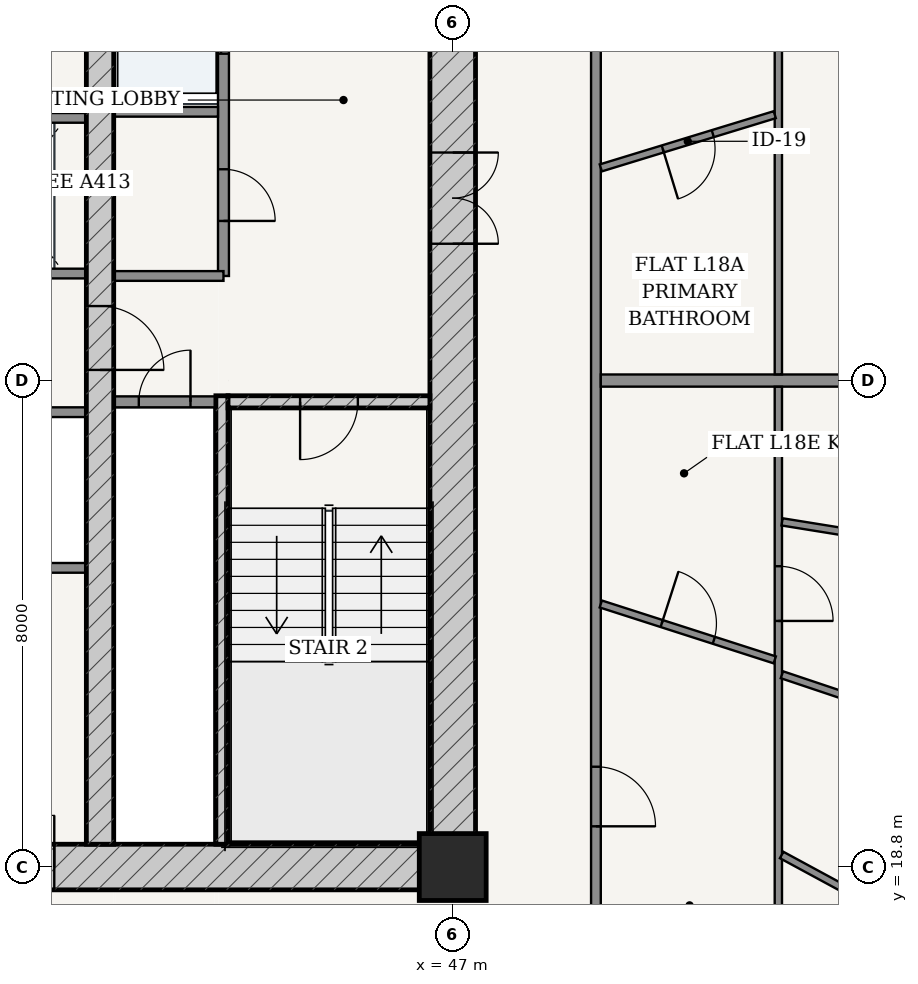
"""IFC4 building model, lengths in metres.
Left out: names, types, materials, properties, quantities, classifications, styles, units other than length and angle.
Written with IfcOpenShell. Run it as: python <this file> out.ifc"""

import sys

from ifc_helpers import new_model, si_unit, direction, frame, frame_2d, origin, origin_2d, place, context, subcontext, project, spatial, rectangle, extrude, source, transform, mapped, element, fill, save


model = new_model("IFC4")
c1 = context("Model", 3, precision=1e-05, world=origin(), true_north=direction((-0.2419218956, 0.970295726276)))
c2 = subcontext(c1, "Body", "Model", "MODEL_VIEW")
j1 = project(units=[si_unit("LENGTHUNIT", "METRE"), si_unit("PLANEANGLEUNIT", "RADIAN")], contexts=[c1])
p1 = place(None, origin())
s1 = spatial("IfcSite", under=j1, at=p1, CompositionType="ELEMENT")
p2 = place(p1, origin())
s2 = spatial("IfcBuilding", under=s1, at=p2, CompositionType="ELEMENT")
p3 = place(p2, frame((0.0, 0.0, 70.8)))
s3 = spatial("IfcBuildingStorey", under=s2, at=p3, CompositionType="ELEMENT", Elevation=70.8)
p4 = place(p3, frame((47.0, 18.8, 0.0), z_axis=(0.0, 0.0, 1.0), x_axis=(1.0, 0.0, 0.0)))
e1 = element("IfcColumn", 1, at=p4, inside=s3, PredefinedType="COLUMN", context=c2, shape_type="SweptSolid", body=[
    extrude(rectangle(XDim=1.1, YDim=1.1, at=origin_2d()), origin(), (0.0, 0.0, 1.0), 3.6),
])
p5 = place(p3, frame((28.625, 18.8, 0.0), z_axis=(0.0, 0.0, 1.0), x_axis=(1.0, 0.0, 0.0)))
e2 = element("IfcWall", 2, at=p5, inside=s3, PredefinedType="SHEAR", context=c2, shape_type="SweptSolid", body=[
    extrude(rectangle(XDim=18.75, YDim=0.75, at=frame_2d((9.375, 0.0))), origin(), (0.0, 0.0, 1.0), 3.15),
])
p6 = place(p5, frame((6.927, 0.0, 0.0)))
e3 = element("IfcOpeningElement", 3, at=p6, cuts=e2, PredefinedType="OPENING", context=c2, shape_type="SweptSolid", body=[
    extrude(rectangle(XDim=0.85, YDim=2.1, at=frame_2d((0.425, 1.05))), frame((0.0, 0.385, 0.0), z_axis=(0.0, -1.0, 0.0), x_axis=(1.0, 0.0, 0.0)), (0.0, 0.0, 1.0), 0.77),
])
p7 = place(p5, frame((8.95, 0.0, 0.0)))
e4 = element("IfcOpeningElement", 4, at=p7, cuts=e2, PredefinedType="OPENING", context=c2, shape_type="SweptSolid", body=[
    extrude(rectangle(XDim=0.85, YDim=2.1, at=frame_2d((0.425, 1.05))), frame((0.0, 0.385, 0.0), z_axis=(0.0, -1.0, 0.0), x_axis=(1.0, 0.0, 0.0)), (0.0, 0.0, 1.0), 0.77),
])
p8 = place(p5, frame((10.972, 0.0, 0.0)))
e5 = element("IfcOpeningElement", 5, at=p8, cuts=e2, PredefinedType="OPENING", context=c2, shape_type="SweptSolid", body=[
    extrude(rectangle(XDim=0.85, YDim=2.1, at=frame_2d((0.425, 1.05))), frame((0.0, 0.385, 0.0), z_axis=(0.0, -1.0, 0.0), x_axis=(1.0, 0.0, 0.0)), (0.0, 0.0, 1.0), 0.77),
])
p9 = place(p3, frame((47.0, 19.175, 0.0), z_axis=(0.0, 0.0, 1.0), x_axis=(0.0, 1.0, 0.0)))
e6 = element("IfcWall", 6, at=p9, inside=s3, PredefinedType="SHEAR", context=c2, shape_type="SweptSolid", body=[
    extrude(rectangle(XDim=15.25, YDim=0.75, at=frame_2d((7.625, 0.0))), origin(), (0.0, 0.0, 1.0), 3.15),
])
p10 = place(p9, frame((9.875, 0.0, 0.0)))
e7 = element("IfcOpeningElement", 7, at=p10, cuts=e6, PredefinedType="OPENING", context=c2, shape_type="SweptSolid", body=[
    extrude(rectangle(XDim=1.5, YDim=2.2, at=frame_2d((0.75, 1.1))), frame((0.0, 0.385, 0.0), z_axis=(0.0, -1.0, 0.0), x_axis=(1.0, 0.0, 0.0)), (0.0, 0.0, 1.0), 0.77),
])
p11 = place(p3, frame((43.205, 19.175, 0.0), z_axis=(0.0, 0.0, 1.0), x_axis=(0.0, 1.0, 0.0)))
e8 = element("IfcWall", 8, at=p11, inside=s3, PredefinedType="SOLIDWALL", context=c2, shape_type="SweptSolid", body=[
    extrude(rectangle(XDim=7.375, YDim=0.2, at=frame_2d((3.688, 0.0))), origin(), (0.0, 0.0, 1.0), 3.15),
])
p12 = place(p3, frame((43.305, 26.45, 0.0), z_axis=(0.0, 0.0, 1.0), x_axis=(1.0, 0.0, 0.0)))
e9 = element("IfcWall", 9, at=p12, inside=s3, PredefinedType="SOLIDWALL", context=c2, shape_type="SweptSolid", body=[
    extrude(rectangle(XDim=3.32, YDim=0.2, at=frame_2d((1.66, 0.0))), origin(), (0.0, 0.0, 1.0), 3.15),
])
p13 = place(p12, frame((1.185, 0.0, 0.0)))
e10 = element("IfcOpeningElement", 10, at=p13, cuts=e9, PredefinedType="OPENING", context=c2, shape_type="SweptSolid", body=[
    extrude(rectangle(XDim=0.95, YDim=2.15, at=frame_2d((0.475, 1.075))), frame((0.0, 0.11, 0.0), z_axis=(0.0, -1.0, 0.0), x_axis=(1.0, 0.0, 0.0)), (0.0, 0.0, 1.0), 0.22),
])
p14 = place(p3, frame((41.2, 19.175, 0.0), z_axis=(0.0, 0.0, 1.0), x_axis=(0.0, 1.0, 0.0)))
e11 = element("IfcWall", 11, at=p14, inside=s3, PredefinedType="SHEAR", context=c2, shape_type="SweptSolid", body=[
    extrude(rectangle(XDim=15.25, YDim=0.45, at=frame_2d((7.625, 0.0))), origin(), (0.0, 0.0, 1.0), 3.15),
])
p15 = place(p14, frame((7.8, 0.0, 0.0)))
e12 = element("IfcOpeningElement", 12, at=p15, cuts=e11, PredefinedType="OPENING", context=c2, shape_type="SweptSolid", body=[
    extrude(rectangle(XDim=1.05, YDim=2.15, at=frame_2d((0.525, 1.075))), frame((0.0, 0.235, 0.0), z_axis=(0.0, -1.0, 0.0), x_axis=(1.0, 0.0, 0.0)), (0.0, 0.0, 1.0), 0.47),
])
p16 = place(p3, frame((41.425, 26.45, 0.0), z_axis=(0.0, 0.0, 1.0), x_axis=(1.0, 0.0, 0.0)))
e13 = element("IfcWall", 13, at=p16, inside=s3, PredefinedType="PARTITIONING", context=c2, shape_type="SweptSolid", body=[
    extrude(rectangle(XDim=1.675, YDim=0.18, at=frame_2d((0.837, 0.0))), origin(), (0.0, 0.0, 1.0), 3.15),
])
p17 = place(p16, frame((0.413, 0.0, 0.0)))
e14 = element("IfcOpeningElement", 14, at=p17, cuts=e13, PredefinedType="OPENING", context=c2, shape_type="SweptSolid", body=[
    extrude(rectangle(XDim=0.85, YDim=2.1, at=frame_2d((0.425, 1.05))), frame((0.0, 0.1, 0.0), z_axis=(0.0, -1.0, 0.0), x_axis=(1.0, 0.0, 0.0)), (0.0, 0.0, 1.0), 0.2),
])
p18 = place(p3, frame((43.23, 28.52, 0.0), z_axis=(0.0, 0.0, 1.0), x_axis=(0.0, 1.0, 0.0)))
e15 = element("IfcWall", 15, at=p18, inside=s3, PredefinedType="PARTITIONING", context=c2, shape_type="SweptSolid", body=[
    extrude(rectangle(XDim=5.905, YDim=0.18, at=frame_2d((2.953, 0.0))), origin(), (0.0, 0.0, 1.0), 3.15),
])
p19 = place(p18, frame((0.905, 0.0, 0.0)))
e16 = element("IfcOpeningElement", 16, at=p19, cuts=e15, PredefinedType="OPENING", context=c2, shape_type="SweptSolid", body=[
    extrude(rectangle(XDim=0.85, YDim=2.1, at=frame_2d((0.425, 1.05))), frame((0.0, 0.1, 0.0), z_axis=(0.0, -1.0, 0.0), x_axis=(1.0, 0.0, 0.0)), (0.0, 0.0, 1.0), 0.2),
])
p20 = place(p18, frame((3.655, 0.0, 0.0)))
e17 = element("IfcOpeningElement", 17, at=p20, cuts=e15, PredefinedType="OPENING", context=c2, shape_type="SweptSolid", body=[
    extrude(rectangle(XDim=1.15, YDim=2.2, at=frame_2d((0.575, 1.1))), frame((0.0, 0.1, 0.0), z_axis=(0.0, -1.0, 0.0), x_axis=(1.0, 0.0, 0.0)), (0.0, 0.0, 1.0), 0.2),
])
p21 = place(p3, frame((41.425, 31.22, 0.0), z_axis=(0.0, 0.0, 1.0), x_axis=(1.0, 0.0, 0.0)))
e18 = element("IfcWall", 18, at=p21, inside=s3, PredefinedType="PARTITIONING", context=c2, shape_type="SweptSolid", body=[
    extrude(rectangle(XDim=1.715, YDim=0.16, at=frame_2d((0.857, 0.0))), origin(), (0.0, 0.0, 1.0), 3.15),
])
p22 = place(p3, frame((41.425, 28.52, 0.0), z_axis=(0.0, 0.0, 1.0), x_axis=(1.0, 0.0, 0.0)))
e19 = element("IfcWall", 19, at=p22, inside=s3, PredefinedType="PARTITIONING", context=c2, shape_type="SweptSolid", body=[
    extrude(rectangle(XDim=1.805, YDim=0.16, at=frame_2d((0.902, 0.0))), origin(), (0.0, 0.0, 1.0), 3.15),
])
p23 = place(p3, frame((35.025, 28.56, 0.0), z_axis=(0.0, 0.0, 1.0), x_axis=(1.0, 0.0, 0.0)))
e20 = element("IfcWall", 20, at=p23, inside=s3, PredefinedType="PARTITIONING", context=c2, shape_type="SweptSolid", body=[
    extrude(rectangle(XDim=5.95, YDim=0.16, at=frame_2d((2.975, 0.0))), origin(), (0.0, 0.0, 1.0), 3.15),
])
p24 = place(p23, frame((0.76, 0.0, 0.0)))
e21 = element("IfcOpeningElement", 21, at=p24, cuts=e20, PredefinedType="OPENING", context=c2, shape_type="SweptSolid", body=[
    extrude(rectangle(XDim=1.1, YDim=2.2, at=frame_2d((0.55, 1.1))), frame((0.0, 0.09, 0.0), z_axis=(0.0, -1.0, 0.0), x_axis=(1.0, 0.0, 0.0)), (0.0, 0.0, 1.0), 0.18),
])
p25 = place(p23, frame((2.425, 0.0, 0.0)))
e22 = element("IfcOpeningElement", 22, at=p25, cuts=e20, PredefinedType="OPENING", context=c2, shape_type="SweptSolid", body=[
    extrude(rectangle(XDim=1.1, YDim=2.2, at=frame_2d((0.55, 1.1))), frame((0.0, 0.09, 0.0), z_axis=(0.0, -1.0, 0.0), x_axis=(1.0, 0.0, 0.0)), (0.0, 0.0, 1.0), 0.18),
])
p26 = place(p23, frame((4.09, 0.0, 0.0)))
e23 = element("IfcOpeningElement", 23, at=p26, cuts=e20, PredefinedType="OPENING", context=c2, shape_type="SweptSolid", body=[
    extrude(rectangle(XDim=1.1, YDim=2.2, at=frame_2d((0.55, 1.1))), frame((0.0, 0.09, 0.0), z_axis=(0.0, -1.0, 0.0), x_axis=(1.0, 0.0, 0.0)), (0.0, 0.0, 1.0), 0.18),
])
for number, where, z_axis, x_axis in (
    (24, (35.025, 31.12, 0.0), (0.0, 0.0, 1.0), (1.0, 0.0, 0.0)),
    (25, (35.025, 26.28, 0.0), (0.0, 0.0, 1.0), (1.0, 0.0, 0.0)),
    (26, (35.025, 23.72, 0.0), (0.0, 0.0, 1.0), (1.0, 0.0, 0.0)),
):
    element("IfcWall", number, at=place(p3, frame(where, z_axis=z_axis, x_axis=x_axis)), inside=s3, PredefinedType="PARTITIONING", context=c2, shape_type="SweptSolid", body=[
        extrude(rectangle(XDim=5.95, YDim=0.16, at=frame_2d((2.975, 0.0))), origin(), (0.0, 0.0, 1.0), 3.15),
    ])
p27 = place(p3, frame((49.355, 16.525, 0.0), z_axis=(0.0, 0.0, 1.0), x_axis=(0.0, 1.0, 0.0)))
e27 = element("IfcWall", 27, at=p27, inside=s3, PredefinedType="PARTITIONING", context=c2, shape_type="SweptSolid", body=[
    extrude(rectangle(XDim=20.55, YDim=0.16, at=frame_2d((10.275, 0.0))), origin(), (0.0, 0.0, 1.0), 2.596),
])
p28 = place(p27, frame((16.537, 0.0, 0.0)))
e28 = element("IfcOpeningElement", 28, at=p28, cuts=e27, PredefinedType="OPENING", context=c2, shape_type="SweptSolid", body=[
    extrude(rectangle(XDim=0.98, YDim=2.2, at=frame_2d((0.49, 1.1))), frame((0.0, 0.09, 0.0), z_axis=(0.0, -1.0, 0.0), x_axis=(1.0, 0.0, 0.0)), (0.0, 0.0, 1.0), 0.18),
])
p29 = place(p27, frame((2.945, 0.0, 0.0)))
e29 = element("IfcOpeningElement", 29, at=p29, cuts=e27, PredefinedType="OPENING", context=c2, shape_type="SweptSolid", body=[
    extrude(rectangle(XDim=0.98, YDim=2.2, at=frame_2d((0.49, 1.1))), frame((0.0, 0.09, 0.0), z_axis=(0.0, -1.0, 0.0), x_axis=(1.0, 0.0, 0.0)), (0.0, 0.0, 1.0), 0.18),
])
p30 = place(p3, frame((49.435, 26.8, 0.0), z_axis=(0.0, 0.0, 1.0), x_axis=(1.0, 0.0, 0.0)))
e30 = element("IfcWall", 30, at=p30, inside=s3, PredefinedType="PARTITIONING", context=c2, shape_type="SweptSolid", body=[
    extrude(rectangle(XDim=17.505, YDim=0.2, at=frame_2d((8.752, 0.0))), origin(), (0.0, 0.0, 1.0), 2.666),
])
p31 = place(p3, frame((52.355, 40.155, 0.0), z_axis=(0.0, 0.0, 1.0), x_axis=(0.0, -1.0, 0.0)))
e31 = element("IfcWall", 31, at=p31, inside=s3, PredefinedType="PARTITIONING", context=c2, shape_type="SweptSolid", body=[
    extrude(rectangle(XDim=13.253, YDim=0.12, at=frame_2d((6.626, 0.0))), origin(), (0.0, 0.0, 1.0), 2.596),
])
p32 = place(p31, frame((6.853, 0.0, 0.0)))
e32 = element("IfcOpeningElement", 32, at=p32, cuts=e31, PredefinedType="OPENING", context=c2, shape_type="SweptSolid", body=[
    extrude(rectangle(XDim=0.9, YDim=2.15, at=frame_2d((0.45, 1.075))), frame((0.0, 0.07, 0.0), z_axis=(0.0, -1.0, 0.0), x_axis=(1.0, 0.0, 0.0)), (0.0, 0.0, 1.0), 0.14),
])
p33 = place(p3, frame((49.435, 30.297, 0.0), z_axis=(0.0, 0.0, 1.0), x_axis=(0.956264731785, 0.292502585877, 0.0)))
e33 = element("IfcWall", 33, at=p33, inside=s3, PredefinedType="PARTITIONING", context=c2, shape_type="SweptSolid", body=[
    extrude(rectangle(XDim=2.991, YDim=0.12, at=frame_2d((1.496, 0.0))), origin(), (0.0, 0.0, 1.0), 3.15),
])
p34 = place(p33, frame((1.066, 0.0, 0.0)))
e34 = element("IfcOpeningElement", 34, at=p34, cuts=e33, PredefinedType="OPENING", context=c2, shape_type="SweptSolid", body=[
    extrude(rectangle(XDim=0.86, YDim=2.15, at=frame_2d((0.43, 1.075))), frame((0.0, 0.07, 0.0), z_axis=(0.0, -1.0, 0.0), x_axis=(1.0, 0.0, 0.0)), (0.0, 0.0, 1.0), 0.14),
])
p35 = place(p3, frame((52.355, 26.698, 0.0), z_axis=(0.0, 0.0, 1.0), x_axis=(0.0, -1.0, 0.0)))
e35 = element("IfcWall", 35, at=p35, inside=s3, PredefinedType="PARTITIONING", context=c2, shape_type="SweptSolid", body=[
    extrude(rectangle(XDim=13.253, YDim=0.12, at=frame_2d((6.626, 0.0))), origin(), (0.0, 0.0, 1.0), 2.596),
])
p36 = place(p35, frame((9.892, 0.0, 0.0)))
e36 = element("IfcOpeningElement", 36, at=p36, cuts=e35, PredefinedType="OPENING", context=c2, shape_type="SweptSolid", body=[
    extrude(rectangle(XDim=0.9, YDim=2.15, at=frame_2d((0.45, 1.075))), frame((0.0, 0.07, 0.0), z_axis=(0.0, -1.0, 0.0), x_axis=(1.0, 0.0, 0.0)), (0.0, 0.0, 1.0), 0.14),
])
p37 = place(p35, frame((2.951, 0.0, 0.0)))
e37 = element("IfcOpeningElement", 37, at=p37, cuts=e35, PredefinedType="OPENING", context=c2, shape_type="SweptSolid", body=[
    extrude(rectangle(XDim=0.9, YDim=2.15, at=frame_2d((0.45, 1.075))), frame((0.0, 0.07, 0.0), z_axis=(0.0, -1.0, 0.0), x_axis=(1.0, 0.0, 0.0)), (0.0, 0.0, 1.0), 0.14),
])
p38 = place(p3, frame((52.409, 18.998, 0.0), z_axis=(0.0, 0.0, 1.0), x_axis=(0.879373936002, -0.476131789193, 0.0)))
e38 = element("IfcWall", 38, at=p38, inside=s3, PredefinedType="PARTITIONING", context=c2, shape_type="SweptSolid", body=[
    extrude(rectangle(XDim=10.913, YDim=0.12, at=frame_2d((5.456, 0.0))), origin(), (0.0, 0.0, 1.0), 2.5),
])
p39 = place(p3, frame((52.414, 21.962, 0.0), z_axis=(0.0, 0.0, 1.0), x_axis=(0.948021751459, -0.318205529118, 0.0)))
e39 = element("IfcWall", 39, at=p39, inside=s3, PredefinedType="PARTITIONING", context=c2, shape_type="SweptSolid", body=[
    extrude(rectangle(XDim=12.994, YDim=0.12, at=frame_2d((6.497, 0.0))), origin(), (0.0, 0.0, 1.0), 2.666),
])
p40 = place(p39, frame((6.047, 0.0, 0.0)))
e40 = element("IfcOpeningElement", 40, at=p40, cuts=e39, PredefinedType="OPENING", context=c2, shape_type="SweptSolid", body=[
    extrude(rectangle(XDim=0.9, YDim=2.15, at=frame_2d((0.45, 1.075))), frame((0.0, 0.07, 0.0), z_axis=(0.0, -1.0, 0.0), x_axis=(1.0, 0.0, 0.0)), (0.0, 0.0, 1.0), 0.14),
])
p41 = place(p3, frame((52.416, 24.476, 0.0), z_axis=(0.0, 0.0, 1.0), x_axis=(0.987257727093, -0.159129445092, 0.0)))
e41 = element("IfcWall", 41, at=p41, inside=s3, PredefinedType="PARTITIONING", context=c2, shape_type="SweptSolid", body=[
    extrude(rectangle(XDim=14.086, YDim=0.12, at=frame_2d((7.043, 0.0))), origin(), (0.0, 0.0, 1.0), 2.5),
])
p42 = place(p41, frame((5.522, 0.0, 0.0)))
e42 = element("IfcOpeningElement", 42, at=p42, cuts=e41, PredefinedType="OPENING", context=c2, shape_type="SweptSolid", body=[
    extrude(rectangle(XDim=0.9, YDim=2.15, at=frame_2d((0.45, 1.075))), frame((0.0, 0.07, 0.0), z_axis=(0.0, -1.0, 0.0), x_axis=(1.0, 0.0, 0.0)), (0.0, 0.0, 1.0), 0.14),
])
p43 = place(p3, frame((49.435, 23.126, 0.0), z_axis=(0.0, 0.0, 1.0), x_axis=(0.952040395248, -0.305972361197, 0.0)))
e43 = element("IfcWall", 43, at=p43, inside=s3, PredefinedType="PARTITIONING", context=c2, shape_type="SweptSolid", body=[
    extrude(rectangle(XDim=3.005, YDim=0.12, at=frame_2d((1.502, 0.0))), origin(), (0.0, 0.0, 1.0), 3.15),
])
p44 = place(p43, frame((1.052, 0.0, 0.0)))
e44 = element("IfcOpeningElement", 44, at=p44, cuts=e43, PredefinedType="OPENING", context=c2, shape_type="SweptSolid", body=[
    extrude(rectangle(XDim=0.9, YDim=2.15, at=frame_2d((0.45, 1.075))), frame((0.0, 0.07, 0.0), z_axis=(0.0, -1.0, 0.0), x_axis=(1.0, 0.0, 0.0)), (0.0, 0.0, 1.0), 0.14),
])
m1 = source(origin(), c2, "Body", "SweptSolid", [
    extrude(rectangle(XDim=1.5, YDim=2.2, at=frame_2d((0.75, 1.1))), frame((0.0, 0.025, 0.0), z_axis=(0.0, -1.0, 0.0), x_axis=(1.0, 0.0, 0.0)), (0.0, 0.0, 1.0), 0.05),
])
p45 = place(p10, frame((1.5, 0.0, 0.0), z_axis=(0.0, 0.0, 1.0), x_axis=(-1.0, 0.0, 0.0)))
e45 = element("IfcDoor", 45, at=p45, inside=s3, OperationType="DOUBLE_DOOR_SINGLE_SWING", PredefinedType="DOOR", context=c2, shape_type="MappedRepresentation", body=[
    mapped(m1, transform((0.0, 0.0, 0.0), scale=1.0)),
])
fill(e7, e45)
m2 = source(origin(), c2, "Body", "SweptSolid", [
    extrude(rectangle(XDim=1.05, YDim=2.15, at=frame_2d((0.525, 1.075))), frame((0.0, 0.025, 0.0), z_axis=(0.0, -1.0, 0.0), x_axis=(1.0, 0.0, 0.0)), (0.0, 0.0, 1.0), 0.05),
])
p46 = place(p15, frame((1.05, 0.0, 0.0), z_axis=(0.0, 0.0, 1.0), x_axis=(-1.0, 0.0, 0.0)))
e46 = element("IfcDoor", 46, at=p46, inside=s3, OperationType="SINGLE_SWING_RIGHT", PredefinedType="DOOR", context=c2, shape_type="MappedRepresentation", body=[
    mapped(m2, transform((0.0, 0.0, 0.0), scale=1.0)),
])
fill(e12, e46)
m3 = source(origin(), c2, "Body", "SweptSolid", [
    extrude(rectangle(XDim=0.95, YDim=2.15, at=frame_2d((0.475, 1.075))), frame((0.0, 0.025, 0.0), z_axis=(0.0, -1.0, 0.0), x_axis=(1.0, 0.0, 0.0)), (0.0, 0.0, 1.0), 0.05),
])
p47 = place(p13, frame((0.95, 0.0, 0.0), z_axis=(0.0, 0.0, 1.0), x_axis=(-1.0, 0.0, 0.0)))
e47 = element("IfcDoor", 47, at=p47, inside=s3, OperationType="SINGLE_SWING_RIGHT", PredefinedType="DOOR", context=c2, shape_type="MappedRepresentation", body=[
    mapped(m3, transform((0.0, 0.0, 0.0), scale=1.0)),
])
fill(e10, e47)
m4 = source(origin(), c2, "Body", "SweptSolid", [
    extrude(rectangle(XDim=0.85, YDim=2.1, at=frame_2d((0.425, 1.05))), frame((0.0, 0.025, 0.0), z_axis=(0.0, -1.0, 0.0), x_axis=(1.0, 0.0, 0.0)), (0.0, 0.0, 1.0), 0.05),
])
p48 = place(p17, origin())
e48 = element("IfcDoor", 48, at=p48, inside=s3, OperationType="SINGLE_SWING_RIGHT", PredefinedType="DOOR", context=c2, shape_type="MappedRepresentation", body=[
    mapped(m4, transform((0.0, 0.0, 0.0), scale=1.0)),
])
fill(e14, e48)
p49 = place(p19, frame((0.85, 0.0, 0.0), z_axis=(0.0, 0.0, 1.0), x_axis=(-1.0, 0.0, 0.0)))
e49 = element("IfcDoor", 49, at=p49, inside=s3, OperationType="SINGLE_SWING_RIGHT", PredefinedType="DOOR", context=c2, shape_type="MappedRepresentation", body=[
    mapped(m4, transform((0.0, 0.0, 0.0), scale=1.0)),
])
fill(e16, e49)
p50 = place(p8, origin())
e50 = element("IfcDoor", 50, at=p50, inside=s3, OperationType="SINGLE_SWING_RIGHT", PredefinedType="DOOR", context=c2, shape_type="MappedRepresentation", body=[
    mapped(m4, transform((0.0, 0.0, 0.0), scale=1.0)),
])
fill(e5, e50)
m5 = source(origin(), c2, "Body", "SweptSolid", [
    extrude(rectangle(XDim=1.15, YDim=2.2, at=frame_2d((0.575, 1.1))), frame((0.0, 0.025, 0.0), z_axis=(0.0, -1.0, 0.0), x_axis=(1.0, 0.0, 0.0)), (0.0, 0.0, 1.0), 0.05),
])
p51 = place(p20, origin())
e51 = element("IfcDoor", 51, at=p51, inside=s3, OperationType="DOUBLE_DOOR_SLIDING", PredefinedType="DOOR", context=c2, shape_type="MappedRepresentation", body=[
    mapped(m5, transform((0.0, 0.0, 0.0), scale=1.0)),
])
fill(e17, e51)
m6 = source(origin(), c2, "Body", "SweptSolid", [
    extrude(rectangle(XDim=0.86, YDim=2.15, at=frame_2d((0.43, 1.075))), frame((0.0, 0.025, 0.0), z_axis=(0.0, -1.0, 0.0), x_axis=(1.0, 0.0, 0.0)), (0.0, 0.0, 1.0), 0.05),
])
p52 = place(p34, frame((0.86, 0.0, 0.0), z_axis=(0.0, 0.0, 1.0), x_axis=(-1.0, 0.0, 0.0)))
e52 = element("IfcDoor", 52, at=p52, inside=s3, OperationType="SINGLE_SWING_RIGHT", PredefinedType="DOOR", context=c2, shape_type="MappedRepresentation", body=[
    mapped(m6, transform((0.0, 0.0, 0.0), scale=1.0)),
])
fill(e34, e52)
m7 = source(origin(), c2, "Body", "SweptSolid", [
    extrude(rectangle(XDim=0.98, YDim=2.2, at=frame_2d((0.49, 1.1))), frame((0.0, 0.025, 0.0), z_axis=(0.0, -1.0, 0.0), x_axis=(1.0, 0.0, 0.0)), (0.0, 0.0, 1.0), 0.05),
])
p53 = place(p29, frame((0.98, 0.0, 0.0), z_axis=(0.0, 0.0, 1.0), x_axis=(-1.0, 0.0, 0.0)))
e53 = element("IfcDoor", 53, at=p53, inside=s3, OperationType="SINGLE_SWING_RIGHT", PredefinedType="DOOR", context=c2, shape_type="MappedRepresentation", body=[
    mapped(m7, transform((0.0, 0.0, 0.0), scale=1.0)),
])
fill(e29, e53)
m8 = source(origin(), c2, "Body", "SweptSolid", [
    extrude(rectangle(XDim=0.9, YDim=2.15, at=frame_2d((0.45, 1.075))), frame((0.0, 0.025, 0.0), z_axis=(0.0, -1.0, 0.0), x_axis=(1.0, 0.0, 0.0)), (0.0, 0.0, 1.0), 0.05),
])
p54 = place(p44, origin())
e54 = element("IfcDoor", 54, at=p54, inside=s3, OperationType="SINGLE_SWING_LEFT", PredefinedType="DOOR", context=c2, shape_type="MappedRepresentation", body=[
    mapped(m8, transform((0.0, 0.0, 0.0), scale=1.0)),
])
fill(e44, e54)
p55 = place(p37, origin())
e55 = element("IfcDoor", 55, at=p55, inside=s3, OperationType="SINGLE_SWING_RIGHT", PredefinedType="DOOR", context=c2, shape_type="MappedRepresentation", body=[
    mapped(m8, transform((0.0, 0.0, 0.0), scale=1.0)),
])
fill(e37, e55)
save(model, sys.argv[1])
